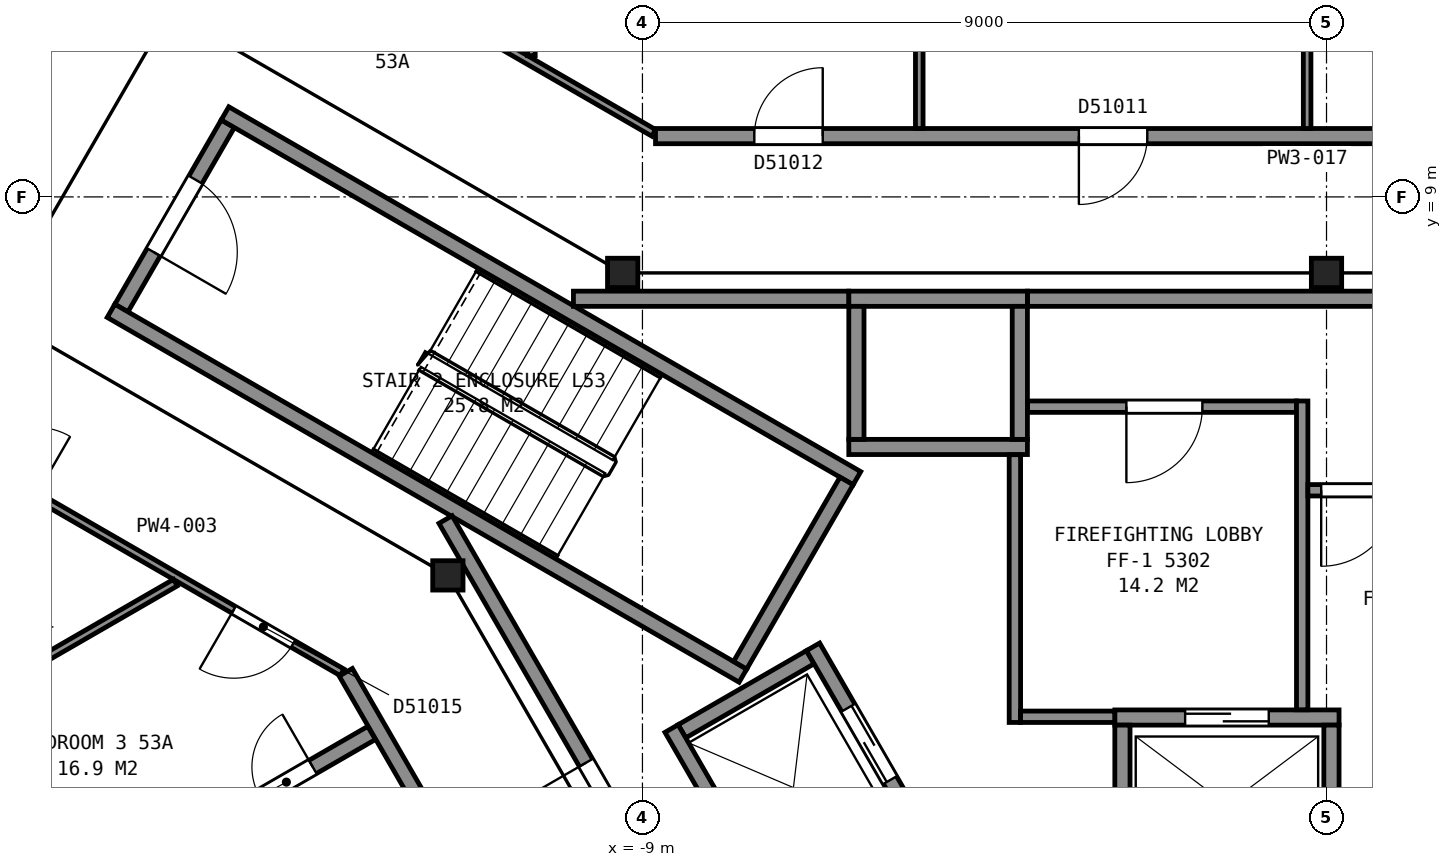
"""IFC4 building model, lengths in metres.
Left out: names, types, materials, properties, quantities, classifications, styles, units other than length and angle.
Written with IfcOpenShell. Run it as: python <this file> out.ifc"""

import sys

from ifc_helpers import new_model, si_unit, direction, frame, frame_2d, origin, origin_2d, place, context, subcontext, project, spatial, rectangle, i_section, extrude, element, fill, save


model = new_model("IFC4")
c1 = context("Model", 3, precision=1e-05, world=origin(), true_north=direction((0.0, 1.0)))
c2 = subcontext(c1, "Body", "Model", "MODEL_VIEW")
j1 = project(units=[si_unit("LENGTHUNIT", "METRE"), si_unit("PLANEANGLEUNIT", "RADIAN")], contexts=[c1])
p1 = place(None, origin())
s1 = spatial("IfcSite", under=j1, at=p1, CompositionType="ELEMENT")
p2 = place(p1, origin())
s2 = spatial("IfcBuilding", under=s1, at=p2, CompositionType="ELEMENT")
p3 = place(p2, frame((0.0, 0.0, 213.8)))
s3 = spatial("IfcBuildingStorey", under=s2, at=p3, CompositionType="ELEMENT", Elevation=213.8)
for number, where, z_axis, x_axis in (
    (1, (0.0, 8.0, 0.0), (0.0, 0.0, 1.0), (1.0, 0.0, 0.0)),
    (2, (-9.26, 8.0, 0.0), (0.0, 0.0, 1.0), (1.0, 0.0, 0.0)),
    (3, (-11.56, 4.02, 0.0), (0.0, 0.0, 1.0), (1.0, 0.0, 0.0)),
):
    element("IfcColumn", number, at=place(p3, frame(where, z_axis=z_axis, x_axis=x_axis)), inside=s3, PredefinedType="COLUMN", context=c2, shape_type="SweptSolid", body=[
        extrude(i_section(OverallWidth=0.399, OverallDepth=0.386, WebThickness=0.021, FlangeThickness=0.033, FilletRadius=0.015, at=origin_2d()), origin(), (0.0, 0.0, 1.0), 3.7),
    ])
p4 = place(p3, frame((-14.455, 9.962, 0.0), z_axis=(0.0, 0.0, 1.0), x_axis=(-0.500049511043, -0.865996816683, 0.0)))
e4 = element("IfcWall", 4, at=p4, inside=s3, PredefinedType="PARTITIONING", context=c2, shape_type="SweptSolid", body=[
    extrude(rectangle(XDim=2.8, YDim=0.2, at=frame_2d((1.4, 0.0))), origin(), (0.0, 0.0, 1.0), 3.45),
])
p5 = place(p4, frame((0.85, 0.0, 0.0)))
e5 = element("IfcOpeningElement", 5, at=p5, cuts=e4, PredefinedType="OPENING", context=c2, shape_type="SweptSolid", body=[
    extrude(rectangle(XDim=1.1, YDim=2.1, at=frame_2d((0.55, 1.05))), frame((0.0, 0.11, 0.0), z_axis=(0.0, -1.0, 0.0), x_axis=(1.0, 0.0, 0.0)), (0.0, 0.0, 1.0), 0.22),
])
for number, where, z_axis, x_axis in (
    (6, (-7.678, 2.701, 0.0), (0.0, 0.0, 1.0), (-0.866, 0.5, 0.0)),
    (7, (-6.178, 5.299, 0.0), (0.0, 0.0, 1.0), (-0.866, 0.5, 0.0)),
):
    element("IfcWall", number, at=place(p3, frame(where, z_axis=z_axis, x_axis=x_axis)), inside=s3, PredefinedType="PARTITIONING", context=c2, shape_type="SweptSolid", body=[
        extrude(rectangle(XDim=9.6, YDim=0.2, at=frame_2d((4.8, 0.0))), origin(), (0.0, 0.0, 1.0), 3.45),
    ])
p6 = place(p3, frame((-6.315, 5.262, 0.0), z_axis=(0.0, 0.0, 1.0), x_axis=(-0.500049511043, -0.865996816683, 0.0)))
e8 = element("IfcWall", 8, at=p6, inside=s3, PredefinedType="PARTITIONING", context=c2, shape_type="SweptSolid", body=[
    extrude(rectangle(XDim=2.8, YDim=0.2, at=frame_2d((1.4, 0.0))), origin(), (0.0, 0.0, 1.0), 3.45),
])
p7 = place(p3, frame((-2.785, 2.15, 0.0), z_axis=(0.0, 0.0, 1.0), x_axis=(1.0, 0.0, 0.0)))
e9 = element("IfcWall", 9, at=p7, inside=s3, PredefinedType="PARTITIONING", context=c2, shape_type="SweptSolid", body=[
    extrude(rectangle(XDim=2.95, YDim=0.2, at=frame_2d((1.475, 0.0))), origin(), (0.0, 0.0, 1.0), 3.7),
])
p8 = place(p7, frame((0.925, 0.0, 0.0)))
e10 = element("IfcOpeningElement", 10, at=p8, cuts=e9, PredefinedType="OPENING", context=c2, shape_type="SweptSolid", body=[
    extrude(rectangle(XDim=1.1, YDim=2.1, at=frame_2d((0.55, 1.05))), frame((0.0, 0.11, 0.0), z_axis=(0.0, -1.0, 0.0), x_axis=(1.0, 0.0, 0.0)), (0.0, 0.0, 1.0), 0.22),
])
for number, where, z_axis, x_axis in (
    (11, (-6.285, 5.71, 0.0), (0.0, 0.0, 1.0), (1.0, 0.0, 0.0)),
    (12, (-6.285, 7.66, 0.0), (0.0, 0.0, 1.0), (1.0, 0.0, 0.0)),
):
    element("IfcWall", number, at=place(p3, frame(where, z_axis=z_axis, x_axis=x_axis)), inside=s3, PredefinedType="PARTITIONING", context=c2, shape_type="SweptSolid", body=[
        extrude(rectangle(XDim=2.35, YDim=0.2, at=frame_2d((1.175, 0.0))), origin(), (0.0, 0.0, 1.0), 3.7),
    ])
for number, where, z_axis, x_axis in (
    (13, (-8.48, 1.969, 0.0), (0.0, 0.0, 1.0), (0.866, 0.5, 0.0)),
    (14, (0.065, 0.1, 0.0), (0.0, 0.0, 1.0), (0.0, 1.0, 0.0)),
    (15, (-2.685, 0.1, 0.0), (0.0, 0.0, 1.0), (0.0, 1.0, 0.0)),
):
    element("IfcWall", number, at=place(p3, frame(where, z_axis=z_axis, x_axis=x_axis)), inside=s3, PredefinedType="PARTITIONING", context=c2, shape_type="SweptSolid", body=[
        extrude(rectangle(XDim=1.95, YDim=0.2, at=frame_2d((0.975, 0.0))), origin(), (0.0, 0.0, 1.0), 3.7),
    ])
for number, where, z_axis, x_axis in (
    (16, (-4.035, 5.81, 0.0), (0.0, 0.0, 1.0), (0.0, 1.0, 0.0)),
    (17, (-6.185, 5.81, 0.0), (0.0, 0.0, 1.0), (0.0, 1.0, 0.0)),
):
    element("IfcWall", number, at=place(p3, frame(where, z_axis=z_axis, x_axis=x_axis)), inside=s3, PredefinedType="PARTITIONING", context=c2, shape_type="SweptSolid", body=[
        extrude(rectangle(XDim=1.75, YDim=0.2, at=frame_2d((0.875, 0.0))), origin(), (0.0, 0.0, 1.0), 3.7),
    ])
p9 = place(p3, frame((-5.28, 0.525, 0.0), z_axis=(0.0, 0.0, 1.0), x_axis=(-0.500037662692, 0.866003658127, 0.0)))
e18 = element("IfcWall", 18, at=p9, inside=s3, PredefinedType="PARTITIONING", context=c2, shape_type="SweptSolid", body=[
    extrude(rectangle(XDim=2.95, YDim=0.2, at=frame_2d((1.475, 0.0))), origin(), (0.0, 0.0, 1.0), 3.7),
])
p10 = place(p9, frame((0.925, 0.0, 0.0)))
e19 = element("IfcOpeningElement", 19, at=p10, cuts=e18, PredefinedType="OPENING", context=c2, shape_type="SweptSolid", body=[
    extrude(rectangle(XDim=1.1, YDim=2.1, at=frame_2d((0.55, 1.05))), frame((0.0, 0.11, 0.0), z_axis=(0.0, -1.0, 0.0), x_axis=(1.0, 0.0, 0.0)), (0.0, 0.0, 1.0), 0.22),
])
p11 = place(p3, frame((-7.242, -0.376, 0.0), z_axis=(0.0, 0.0, 1.0), x_axis=(-0.499996545922, 0.866027397988, 0.0)))
e20 = element("IfcWall", 20, at=p11, inside=s3, PredefinedType="PARTITIONING", context=c2, shape_type="SweptSolid", body=[
    extrude(rectangle(XDim=2.75, YDim=0.2, at=frame_2d((1.375, 0.0))), origin(), (0.0, 0.0, 1.0), 3.7),
])
p12 = place(p3, frame((-11.591, 4.755, 0.0), z_axis=(0.0, 0.0, 1.0), x_axis=(0.500043977787, -0.866000011708, 0.0)))
e21 = element("IfcWall", 21, at=p12, inside=s3, PredefinedType="PARTITIONING", context=c2, shape_type="SweptSolid", body=[
    extrude(rectangle(XDim=6.617, YDim=0.2, at=frame_2d((3.308, 0.0))), origin(), (0.0, 0.0, 1.0), 3.45),
])
p13 = place(p12, frame((3.695, 0.0, 0.0)))
e22 = element("IfcOpeningElement", 22, at=p13, cuts=e21, PredefinedType="OPENING", context=c2, shape_type="SweptSolid", body=[
    extrude(rectangle(XDim=1.8, YDim=2.1, at=frame_2d((0.9, 1.05))), frame((0.0, 0.11, 0.0), z_axis=(0.0, -1.0, 0.0), x_axis=(1.0, 0.0, 0.0)), (0.0, 0.0, 1.0), 0.22),
])
p14 = place(p3, frame((-9.908, 7.66, 0.0), z_axis=(0.0, 0.0, 1.0), x_axis=(1.0, 0.0, 0.0)))
e23 = element("IfcWall", 23, at=p14, inside=s3, PredefinedType="PARTITIONING", context=c2, shape_type="SweptSolid", body=[
    extrude(rectangle(XDim=3.621, YDim=0.2, at=frame_2d((1.811, 0.0))), origin(), (0.0, 0.0, 1.0), 3.45),
])
p15 = place(p3, frame((-4.1, 2.085, 0.0), z_axis=(0.0, 0.0, 1.0), x_axis=(0.0, 1.0, 0.0)))
e24 = element("IfcWall", 24, at=p15, inside=s3, PredefinedType="PARTITIONING", context=c2, shape_type="SweptSolid", body=[
    extrude(rectangle(XDim=3.523, YDim=0.15, at=frame_2d((1.761, 0.0))), origin(), (0.0, 0.0, 1.0), 3.45),
])
p16 = place(p3, frame((-4.025, 2.16, 0.0), z_axis=(0.0, 0.0, 1.0), x_axis=(1.0, 0.0, 0.0)))
e25 = element("IfcWall", 25, at=p16, inside=s3, PredefinedType="PARTITIONING", context=c2, shape_type="SweptSolid", body=[
    extrude(rectangle(XDim=1.238, YDim=0.15, at=frame_2d((0.619, 0.0))), origin(), (0.0, 0.0, 1.0), 3.45),
])
p17 = place(p3, frame((-3.933, 6.24, 0.0), z_axis=(0.0, 0.0, 1.0), x_axis=(1.0, 0.0, 0.0)))
e26 = element("IfcWall", 26, at=p17, inside=s3, PredefinedType="PARTITIONING", context=c2, shape_type="SweptSolid", body=[
    extrude(rectangle(XDim=3.538, YDim=0.15, at=frame_2d((1.769, 0.0))), origin(), (0.0, 0.0, 1.0), 3.45),
])
p18 = place(p17, frame((1.3, 0.0, 0.0)))
e27 = element("IfcOpeningElement", 27, at=p18, cuts=e26, PredefinedType="OPENING", context=c2, shape_type="SweptSolid", body=[
    extrude(rectangle(XDim=1.0, YDim=2.1, at=frame_2d((0.5, 1.05))), frame((0.0, 0.085, 0.0), z_axis=(0.0, -1.0, 0.0), x_axis=(1.0, 0.0, 0.0)), (0.0, 0.0, 1.0), 0.17),
])
p19 = place(p3, frame((-3.933, 7.66, 0.0), z_axis=(0.0, 0.0, 1.0), x_axis=(1.0, 0.0, 0.0)))
e28 = element("IfcWall", 28, at=p19, inside=s3, PredefinedType="PARTITIONING", context=c2, shape_type="SweptSolid", body=[
    extrude(rectangle(XDim=13.841, YDim=0.2, at=frame_2d((6.92, 0.0))), origin(), (0.0, 0.0, 1.0), 3.45),
])
p20 = place(p3, frame((-0.32, 2.252, 0.0), z_axis=(0.0, 0.0, 1.0), x_axis=(0.0, 1.0, 0.0)))
e29 = element("IfcWall", 29, at=p20, inside=s3, PredefinedType="PARTITIONING", context=c2, shape_type="SweptSolid", body=[
    extrude(rectangle(XDim=4.063, YDim=0.15, at=frame_2d((2.031, 0.0))), origin(), (0.0, 0.0, 1.0), 3.45),
])
p21 = place(p3, frame((-0.245, 5.14, 0.0), z_axis=(0.0, 0.0, 1.0), x_axis=(1.0, 0.0, 0.0)))
e30 = element("IfcWall", 30, at=p21, inside=s3, PredefinedType="PARTITIONING", context=c2, shape_type="SweptSolid", body=[
    extrude(rectangle(XDim=5.11, YDim=0.15, at=frame_2d((2.555, 0.0))), origin(), (0.0, 0.0, 1.0), 3.45),
])
p22 = place(p21, frame((0.175, 0.0, 0.0)))
e31 = element("IfcOpeningElement", 31, at=p22, cuts=e30, PredefinedType="OPENING", context=c2, shape_type="SweptSolid", body=[
    extrude(rectangle(XDim=1.0, YDim=2.1, at=frame_2d((0.5, 1.05))), frame((0.0, 0.085, 0.0), z_axis=(0.0, -1.0, 0.0), x_axis=(1.0, 0.0, 0.0)), (0.0, 0.0, 1.0), 0.17),
])
p23 = place(p3, frame((-19.955, 6.844, 0.0), z_axis=(0.0, 0.0, 1.0), x_axis=(0.500415732313, 0.865785247537, 0.0)))
e32 = element("IfcWall", 32, at=p23, inside=s3, PredefinedType="PARTITIONING", context=c2, shape_type="SweptSolid", body=[
    extrude(rectangle(XDim=8.097, YDim=0.1, at=frame_2d((4.049, 0.0))), origin(), (0.0, 0.0, 1.0), 2.713),
])
p24 = place(p23, frame((3.6, 0.0, 0.0)))
e33 = element("IfcOpeningElement", 33, at=p24, cuts=e32, PredefinedType="OPENING", context=c2, shape_type="SweptSolid", body=[
    extrude(rectangle(XDim=0.9, YDim=2.1, at=frame_2d((0.45, 1.05))), frame((0.0, 0.06, 0.0), z_axis=(0.0, -1.0, 0.0), x_axis=(1.0, 0.0, 0.0)), (0.0, 0.0, 1.0), 0.12),
])
p25 = place(p3, frame((-12.952, 2.744, 0.0), z_axis=(0.0, 0.0, 1.0), x_axis=(-0.86608949446, 0.499888975259, 0.0)))
e34 = element("IfcWall", 34, at=p25, inside=s3, PredefinedType="PARTITIONING", context=c2, shape_type="SweptSolid", body=[
    extrude(rectangle(XDim=8.165, YDim=0.1, at=frame_2d((4.083, 0.0))), origin(), (0.0, 0.0, 1.0), 2.713),
])
p26 = place(p25, frame((4.65, 0.0, 0.0)))
e35 = element("IfcOpeningElement", 35, at=p26, cuts=e34, PredefinedType="OPENING", context=c2, shape_type="SweptSolid", body=[
    extrude(rectangle(XDim=0.9, YDim=2.1, at=frame_2d((0.45, 1.05))), frame((0.0, 0.06, 0.0), z_axis=(0.0, -1.0, 0.0), x_axis=(1.0, 0.0, 0.0)), (0.0, 0.0, 1.0), 0.12),
])
p27 = place(p25, frame((0.746, 0.0, 0.0)))
e36 = element("IfcOpeningElement", 36, at=p27, cuts=e34, PredefinedType="OPENING", context=c2, shape_type="SweptSolid", body=[
    extrude(rectangle(XDim=0.9, YDim=2.1, at=frame_2d((0.45, 1.05))), frame((0.0, 0.06, 0.0), z_axis=(0.0, -1.0, 0.0), x_axis=(1.0, 0.0, 0.0)), (0.0, 0.0, 1.0), 0.12),
])
p28 = place(p3, frame((-18.308, 2.099, 0.0), z_axis=(0.0, 0.0, 1.0), x_axis=(0.866054218355, 0.499950088379, 0.0)))
e37 = element("IfcWall", 37, at=p28, inside=s3, PredefinedType="PARTITIONING", context=c2, shape_type="SweptSolid", body=[
    extrude(rectangle(XDim=3.652, YDim=0.1, at=frame_2d((1.826, 0.0))), origin(), (0.0, 0.0, 1.0), 2.713),
])
p29 = place(p3, frame((-15.921, 13.923, 0.0), z_axis=(0.0, 0.0, 1.0), x_axis=(0.866088973199, -0.499889878377, 0.0)))
e38 = element("IfcWall", 38, at=p29, inside=s3, PredefinedType="PARTITIONING", context=c2, shape_type="SweptSolid", body=[
    extrude(rectangle(XDim=8.163, YDim=0.1, at=frame_2d((4.082, 0.0))), origin(), (0.0, 0.0, 1.0), 2.713),
])
p30 = place(p3, frame((-12.563, 1.948, 0.0), z_axis=(0.0, 0.0, 1.0), x_axis=(-0.866041588165, -0.499971966783, 0.0)))
e39 = element("IfcWall", 39, at=p30, inside=s3, PredefinedType="PARTITIONING", context=c2, shape_type="SweptSolid", body=[
    extrude(rectangle(XDim=2.795, YDim=0.2, at=frame_2d((1.397, 0.0))), origin(), (0.0, 0.0, 1.0), 2.713),
])
p31 = place(p30, frame((0.895, 0.0, 0.0)))
e40 = element("IfcOpeningElement", 40, at=p31, cuts=e39, PredefinedType="OPENING", context=c2, shape_type="SweptSolid", body=[
    extrude(rectangle(XDim=0.8, YDim=2.1, at=frame_2d((0.4, 1.05))), frame((0.0, 0.11, 0.0), z_axis=(0.0, -1.0, 0.0), x_axis=(1.0, 0.0, 0.0)), (0.0, 0.0, 1.0), 0.22),
])
p32 = place(p3, frame((-4.075, -12.545, 0.0), z_axis=(0.0, 0.0, 1.0), x_axis=(-0.499999743747, 0.866025551732, 0.0)))
e41 = element("IfcWall", 41, at=p32, inside=s3, PredefinedType="PARTITIONING", context=c2, shape_type="SweptSolid", body=[
    extrude(rectangle(XDim=17.656, YDim=0.2, at=frame_2d((8.828, 0.0))), origin(), (0.0, 0.0, 1.0), 2.713),
])
p33 = place(p32, frame((9.895, 0.0, 0.0)))
e42 = element("IfcOpeningElement", 42, at=p33, cuts=e41, PredefinedType="OPENING", context=c2, shape_type="SweptSolid", body=[
    extrude(rectangle(XDim=0.9, YDim=2.1, at=frame_2d((0.45, 1.05))), frame((0.0, 0.11, 0.0), z_axis=(0.0, -1.0, 0.0), x_axis=(1.0, 0.0, 0.0)), (0.0, 0.0, 1.0), 0.22),
])
p34 = place(p32, frame((6.622, 0.0, 0.0)))
e43 = element("IfcOpeningElement", 43, at=p34, cuts=e41, PredefinedType="OPENING", context=c2, shape_type="SweptSolid", body=[
    extrude(rectangle(XDim=0.9, YDim=2.1, at=frame_2d((0.45, 1.05))), frame((0.0, 0.11, 0.0), z_axis=(0.0, -1.0, 0.0), x_axis=(1.0, 0.0, 0.0)), (0.0, 0.0, 1.0), 0.22),
])
p35 = place(p32, frame((0.268, 0.0, 0.0)))
e44 = element("IfcOpeningElement", 44, at=p35, cuts=e41, PredefinedType="OPENING", context=c2, shape_type="SweptSolid", body=[
    extrude(rectangle(XDim=0.9, YDim=2.1, at=frame_2d((0.45, 1.05))), frame((0.0, 0.11, 0.0), z_axis=(0.0, -1.0, 0.0), x_axis=(1.0, 0.0, 0.0)), (0.0, 0.0, 1.0), 0.22),
])
p36 = place(p3, frame((-10.461, 10.859, 0.0), z_axis=(0.0, 0.0, 1.0), x_axis=(0.0, 1.0, 0.0)))
e45 = element("IfcWall", 45, at=p36, inside=s3, PredefinedType="PARTITIONING", context=c2, shape_type="SweptSolid", body=[
    extrude(rectangle(XDim=3.947, YDim=0.1, at=frame_2d((1.974, 0.0))), origin(), (0.0, 0.0, 1.0), 2.713),
])
p37 = place(p3, frame((-8.828, 9.8, 0.0), z_axis=(0.0, 0.0, 1.0), x_axis=(1.0, 0.0, 0.0)))
e46 = element("IfcWall", 46, at=p37, inside=s3, PredefinedType="PARTITIONING", context=c2, shape_type="SweptSolid", body=[
    extrude(rectangle(XDim=17.706, YDim=0.2, at=frame_2d((8.853, 0.0))), origin(), (0.0, 0.0, 1.0), 2.713),
])
p38 = place(p37, frame((14.976, 0.0, 0.0)))
e47 = element("IfcOpeningElement", 47, at=p38, cuts=e46, PredefinedType="OPENING", context=c2, shape_type="SweptSolid", body=[
    extrude(rectangle(XDim=0.9, YDim=2.1, at=frame_2d((0.45, 1.05))), frame((0.0, 0.11, 0.0), z_axis=(0.0, -1.0, 0.0), x_axis=(1.0, 0.0, 0.0)), (0.0, 0.0, 1.0), 0.22),
])
p39 = place(p37, frame((10.673, 0.0, 0.0)))
e48 = element("IfcOpeningElement", 48, at=p39, cuts=e46, PredefinedType="OPENING", context=c2, shape_type="SweptSolid", body=[
    extrude(rectangle(XDim=0.9, YDim=2.1, at=frame_2d((0.45, 1.05))), frame((0.0, 0.11, 0.0), z_axis=(0.0, -1.0, 0.0), x_axis=(1.0, 0.0, 0.0)), (0.0, 0.0, 1.0), 0.22),
])
p40 = place(p37, frame((5.57, 0.0, 0.0)))
e49 = element("IfcOpeningElement", 49, at=p40, cuts=e46, PredefinedType="OPENING", context=c2, shape_type="SweptSolid", body=[
    extrude(rectangle(XDim=0.9, YDim=2.1, at=frame_2d((0.45, 1.05))), frame((0.0, 0.11, 0.0), z_axis=(0.0, -1.0, 0.0), x_axis=(1.0, 0.0, 0.0)), (0.0, 0.0, 1.0), 0.22),
])
p41 = place(p37, frame((1.3, 0.0, 0.0)))
e50 = element("IfcOpeningElement", 50, at=p41, cuts=e46, PredefinedType="OPENING", context=c2, shape_type="SweptSolid", body=[
    extrude(rectangle(XDim=0.9, YDim=2.1, at=frame_2d((0.45, 1.05))), frame((0.0, 0.11, 0.0), z_axis=(0.0, -1.0, 0.0), x_axis=(1.0, 0.0, 0.0)), (0.0, 0.0, 1.0), 0.22),
])
for number, where, z_axis, x_axis in (
    (51, (-5.358, 9.9, 0.0), (0.0, 0.0, 1.0), (0.0, 1.0, 0.0)),
    (52, (-0.255, 9.9, 0.0), (0.0, 0.0, 1.0), (0.0, 1.0, 0.0)),
):
    element("IfcWall", number, at=place(p3, frame(where, z_axis=z_axis, x_axis=x_axis)), inside=s3, PredefinedType="PARTITIONING", context=c2, shape_type="SweptSolid", body=[
        extrude(rectangle(XDim=4.906, YDim=0.1, at=frame_2d((2.453, 0.0))), origin(), (0.0, 0.0, 1.0), 2.713),
    ])
p42 = place(p5, origin())
e53 = element("IfcDoor", 53, at=p42, inside=s3, OperationType="SINGLE_SWING_RIGHT", PredefinedType="DOOR", context=c2, shape_type="SweptSolid", body=[
    extrude(rectangle(XDim=1.1, YDim=2.1, at=frame_2d((0.55, 1.05))), frame((0.0, 0.025, 0.0), z_axis=(0.0, -1.0, 0.0), x_axis=(1.0, 0.0, 0.0)), (0.0, 0.0, 1.0), 0.05),
])
fill(e5, e53)
p43 = place(p8, origin())
e54 = element("IfcDoor", 54, at=p43, inside=s3, OperationType="SLIDING_TO_LEFT", PredefinedType="DOOR", context=c2, shape_type="SweptSolid", body=[
    extrude(rectangle(XDim=1.1, YDim=2.1, at=frame_2d((0.55, 1.05))), frame((0.0, 0.025, 0.0), z_axis=(0.0, -1.0, 0.0), x_axis=(1.0, 0.0, 0.0)), (0.0, 0.0, 1.0), 0.05),
])
fill(e10, e54)
p44 = place(p10, origin())
e55 = element("IfcDoor", 55, at=p44, inside=s3, OperationType="SLIDING_TO_LEFT", PredefinedType="DOOR", context=c2, shape_type="SweptSolid", body=[
    extrude(rectangle(XDim=1.1, YDim=2.1, at=frame_2d((0.55, 1.05))), frame((0.0, 0.025, 0.0), z_axis=(0.0, -1.0, 0.0), x_axis=(1.0, 0.0, 0.0)), (0.0, 0.0, 1.0), 0.05),
])
fill(e19, e55)
p45 = place(p13, origin())
e56 = element("IfcDoor", 56, at=p45, inside=s3, OperationType="DOUBLE_DOOR_SINGLE_SWING", PredefinedType="DOOR", context=c2, shape_type="SweptSolid", body=[
    extrude(rectangle(XDim=1.8, YDim=2.1, at=frame_2d((0.9, 1.05))), frame((0.0, 0.025, 0.0), z_axis=(0.0, -1.0, 0.0), x_axis=(1.0, 0.0, 0.0)), (0.0, 0.0, 1.0), 0.05),
])
fill(e22, e56)
p46 = place(p18, origin())
e57 = element("IfcDoor", 57, at=p46, inside=s3, OperationType="SINGLE_SWING_LEFT", PredefinedType="DOOR", context=c2, shape_type="SweptSolid", body=[
    extrude(rectangle(XDim=1.0, YDim=2.1, at=frame_2d((0.5, 1.05))), frame((0.0, 0.025, 0.0), z_axis=(0.0, -1.0, 0.0), x_axis=(1.0, 0.0, 0.0)), (0.0, 0.0, 1.0), 0.05),
])
fill(e27, e57)
p47 = place(p22, origin())
e58 = element("IfcDoor", 58, at=p47, inside=s3, OperationType="SINGLE_SWING_LEFT", PredefinedType="DOOR", context=c2, shape_type="SweptSolid", body=[
    extrude(rectangle(XDim=1.0, YDim=2.1, at=frame_2d((0.5, 1.05))), frame((0.0, 0.025, 0.0), z_axis=(0.0, -1.0, 0.0), x_axis=(1.0, 0.0, 0.0)), (0.0, 0.0, 1.0), 0.05),
])
fill(e31, e58)
p48 = place(p27, origin())
e59 = element("IfcDoor", 59, at=p48, inside=s3, OperationType="SINGLE_SWING_RIGHT", PredefinedType="DOOR", context=c2, shape_type="SweptSolid", body=[
    extrude(rectangle(XDim=0.9, YDim=2.1, at=frame_2d((0.45, 1.05))), frame((0.0, 0.025, 0.0), z_axis=(0.0, -1.0, 0.0), x_axis=(1.0, 0.0, 0.0)), (0.0, 0.0, 1.0), 0.05),
])
fill(e36, e59)
p49 = place(p31, origin())
e60 = element("IfcDoor", 60, at=p49, inside=s3, OperationType="SINGLE_SWING_LEFT", PredefinedType="DOOR", context=c2, shape_type="SweptSolid", body=[
    extrude(rectangle(XDim=0.8, YDim=2.1, at=frame_2d((0.4, 1.05))), frame((0.0, 0.025, 0.0), z_axis=(0.0, -1.0, 0.0), x_axis=(1.0, 0.0, 0.0)), (0.0, 0.0, 1.0), 0.05),
])
fill(e40, e60)
p50 = place(p40, origin())
e61 = element("IfcDoor", 61, at=p50, inside=s3, OperationType="SINGLE_SWING_LEFT", PredefinedType="DOOR", context=c2, shape_type="SweptSolid", body=[
    extrude(rectangle(XDim=0.9, YDim=2.1, at=frame_2d((0.45, 1.05))), frame((0.0, 0.025, 0.0), z_axis=(0.0, -1.0, 0.0), x_axis=(1.0, 0.0, 0.0)), (0.0, 0.0, 1.0), 0.05),
])
fill(e49, e61)
p51 = place(p41, origin())
e62 = element("IfcDoor", 62, at=p51, inside=s3, OperationType="SINGLE_SWING_RIGHT", PredefinedType="DOOR", context=c2, shape_type="SweptSolid", body=[
    extrude(rectangle(XDim=0.9, YDim=2.1, at=frame_2d((0.45, 1.05))), frame((0.0, 0.025, 0.0), z_axis=(0.0, -1.0, 0.0), x_axis=(1.0, 0.0, 0.0)), (0.0, 0.0, 1.0), 0.05),
])
fill(e50, e62)
save(model, sys.argv[1])
